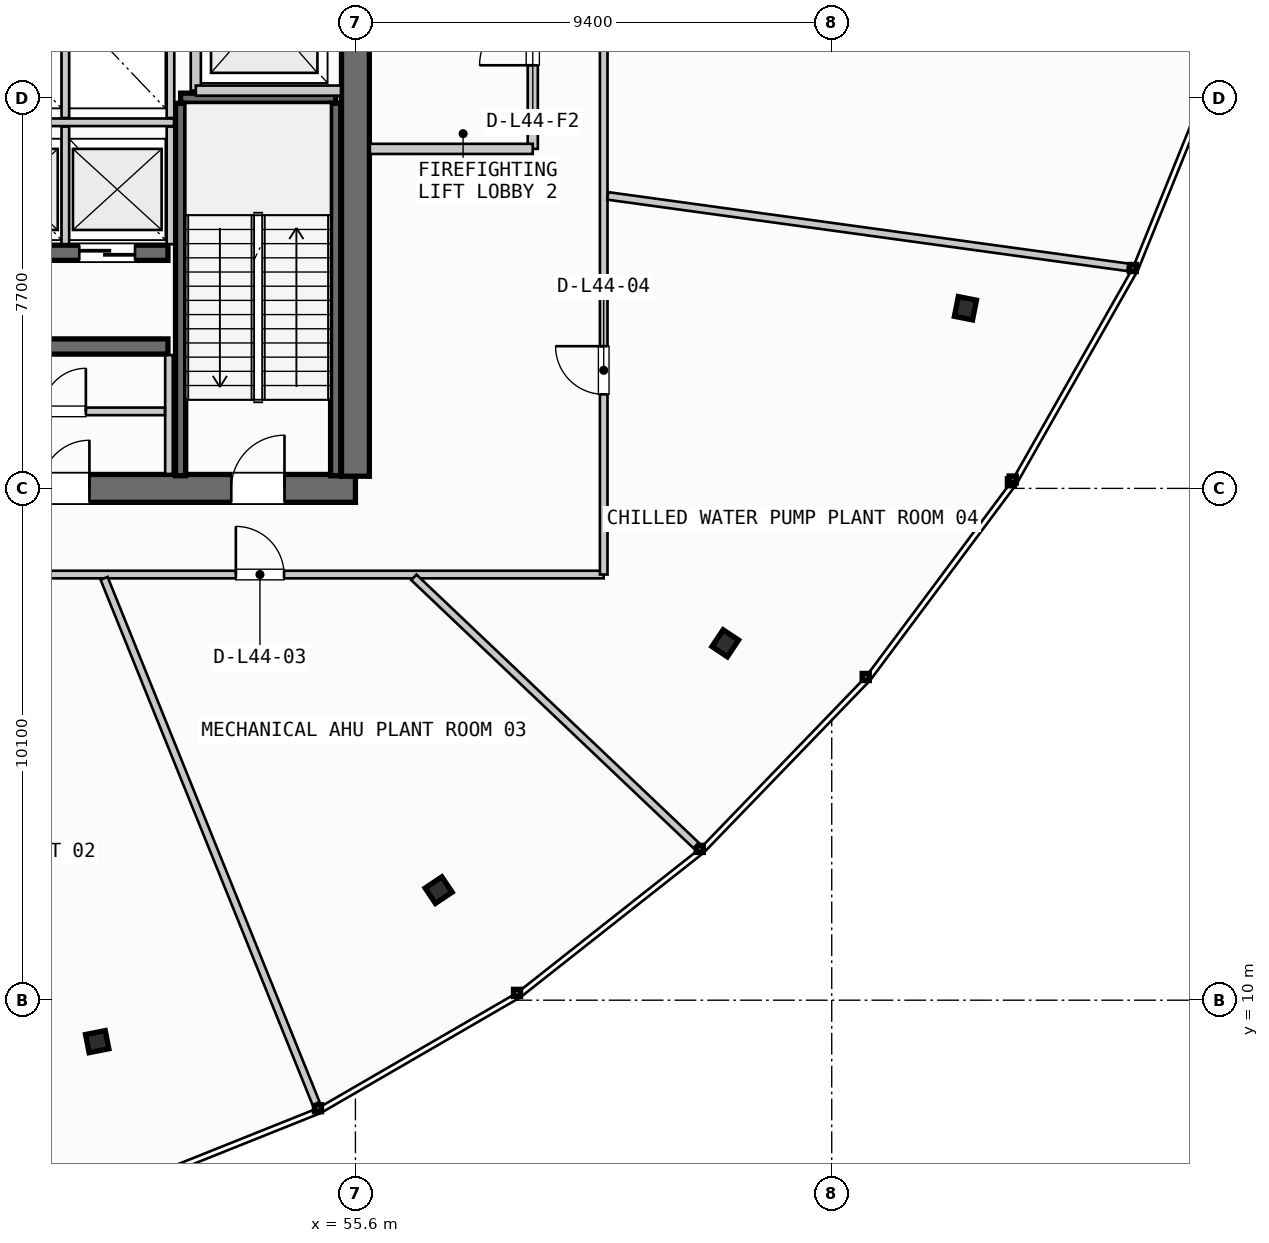
"""IFC4 building model, lengths in metres.
Left out: names, types, materials, properties, quantities, classifications, styles, units other than length and angle.
Written with IfcOpenShell. Run it as: python <this file> out.ifc"""

import sys

from ifc_helpers import new_model, si_unit, direction, frame, frame_2d, origin, origin_2d, place, context, subcontext, project, spatial, rectangle, i_section, extrude, source, transform, mapped, element, fill, save


model = new_model("IFC4")
c1 = context("Model", 3, precision=1e-05, world=origin(), true_north=direction((0.0, 1.0)))
c2 = subcontext(c1, "Body", "Model", "MODEL_VIEW")
j1 = project(units=[si_unit("LENGTHUNIT", "METRE"), si_unit("PLANEANGLEUNIT", "RADIAN")], contexts=[c1])
p1 = place(None, origin())
s1 = spatial("IfcSite", under=j1, at=p1, CompositionType="ELEMENT")
p2 = place(p1, origin())
s2 = spatial("IfcBuilding", under=s1, at=p2, CompositionType="ELEMENT")
p3 = place(p2, frame((0.0, 0.0, 171.4)))
s3 = spatial("IfcBuildingStorey", under=s2, at=p3, CompositionType="ELEMENT", Elevation=171.4)
p4 = place(p3, frame((38.0, 20.1, 0.0), z_axis=(0.0, 0.0, 1.0), x_axis=(1.0, 0.0, 0.0)))
e1 = element("IfcWall", 1, at=p4, inside=s3, PredefinedType="SHEAR", context=c2, shape_type="SweptSolid", body=[
    extrude(rectangle(XDim=17.6, YDim=0.55, at=frame_2d((8.8, 0.0))), origin(), (0.0, 0.0, 1.0), 4.58),
])
p5 = place(p4, frame((1.4, 0.0, 0.0)))
e2 = element("IfcOpeningElement", 2, at=p5, cuts=e1, PredefinedType="OPENING", context=c2, shape_type="SweptSolid", body=[
    extrude(rectangle(XDim=1.05, YDim=2.15, at=frame_2d((0.525, 1.075))), frame((0.0, 0.285, 0.0), z_axis=(0.0, -1.0, 0.0), x_axis=(1.0, 0.0, 0.0)), (0.0, 0.0, 1.0), 0.57),
])
p6 = place(p4, frame((15.15, 0.0, 0.0)))
e3 = element("IfcOpeningElement", 3, at=p6, cuts=e1, PredefinedType="OPENING", context=c2, shape_type="SweptSolid", body=[
    extrude(rectangle(XDim=1.05, YDim=2.15, at=frame_2d((0.525, 1.075))), frame((0.0, 0.285, 0.0), z_axis=(0.0, -1.0, 0.0), x_axis=(1.0, 0.0, 0.0)), (0.0, 0.0, 1.0), 0.57),
])
p7 = place(p4, frame((5.25, 0.0, 0.0)))
e4 = element("IfcOpeningElement", 4, at=p7, cuts=e1, PredefinedType="OPENING", context=c2, shape_type="SweptSolid", body=[
    extrude(rectangle(XDim=0.9, YDim=2.15, at=frame_2d((0.45, 1.075))), frame((0.0, 0.285, 0.0), z_axis=(0.0, -1.0, 0.0), x_axis=(1.0, 0.0, 0.0)), (0.0, 0.0, 1.0), 0.57),
])
p8 = place(p4, frame((11.4, 0.0, 0.0)))
e5 = element("IfcOpeningElement", 5, at=p8, cuts=e1, PredefinedType="OPENING", context=c2, shape_type="SweptSolid", body=[
    extrude(rectangle(XDim=0.95, YDim=2.15, at=frame_2d((0.475, 1.075))), frame((0.0, 0.285, 0.0), z_axis=(0.0, -1.0, 0.0), x_axis=(1.0, 0.0, 0.0)), (0.0, 0.0, 1.0), 0.57),
])
p9 = place(p3, frame((55.6, 20.34, 0.0), z_axis=(0.0, 0.0, 1.0), x_axis=(0.0, 1.0, 0.0)))
e6 = element("IfcWall", 6, at=p9, inside=s3, PredefinedType="SHEAR", context=c2, shape_type="SweptSolid", body=[
    extrude(rectangle(XDim=14.92, YDim=0.55, at=frame_2d((7.46, 0.0))), origin(), (0.0, 0.0, 1.0), 4.58),
])
p10 = place(p9, frame((12.71, 0.0, 0.0)))
e7 = element("IfcOpeningElement", 7, at=p10, cuts=e6, PredefinedType="OPENING", context=c2, shape_type="SweptSolid", body=[
    extrude(rectangle(XDim=1.05, YDim=2.15, at=frame_2d((0.525, 1.075))), frame((0.0, 0.285, 0.0), z_axis=(0.0, -1.0, 0.0), x_axis=(1.0, 0.0, 0.0)), (0.0, 0.0, 1.0), 0.57),
])
p11 = place(p9, frame((8.61, 0.0, 0.0)))
e8 = element("IfcOpeningElement", 8, at=p11, cuts=e6, PredefinedType="OPENING", context=c2, shape_type="SweptSolid", body=[
    extrude(rectangle(XDim=1.1, YDim=2.2, at=frame_2d((0.55, 1.1))), frame((0.0, 0.285, 0.0), z_axis=(0.0, -1.0, 0.0), x_axis=(1.0, 0.0, 0.0)), (0.0, 0.0, 1.0), 0.57),
])
p12 = place(p3, frame((47.65, 22.9, 0.0), z_axis=(0.0, 0.0, 1.0), x_axis=(1.0, 0.0, 0.0)))
e9 = element("IfcWall", 9, at=p12, inside=s3, PredefinedType="SHEAR", context=c2, shape_type="SweptSolid", body=[
    extrude(rectangle(XDim=4.25, YDim=0.3, at=frame_2d((2.125, 0.0))), origin(), (0.0, 0.0, 1.0), 4.58),
])
p13 = place(p3, frame((47.65, 24.75, 0.0), z_axis=(0.0, 0.0, 1.0), x_axis=(1.0, 0.0, 0.0)))
e10 = element("IfcWall", 10, at=p13, inside=s3, PredefinedType="SHEAR", context=c2, shape_type="SweptSolid", body=[
    extrude(rectangle(XDim=4.25, YDim=0.3, at=frame_2d((2.125, 0.0))), origin(), (0.0, 0.0, 1.0), 4.58),
])
p14 = place(p13, frame((0.45, 0.0, 0.0)))
e11 = element("IfcOpeningElement", 11, at=p14, cuts=e10, PredefinedType="OPENING", context=c2, shape_type="SweptSolid", body=[
    extrude(rectangle(XDim=1.1, YDim=2.2, at=frame_2d((0.55, 1.1))), frame((0.0, 0.16, 0.0), z_axis=(0.0, -1.0, 0.0), x_axis=(1.0, 0.0, 0.0)), (0.0, 0.0, 1.0), 0.32),
])
p15 = place(p13, frame((2.5, 0.0, 0.0)))
e12 = element("IfcOpeningElement", 12, at=p15, cuts=e10, PredefinedType="OPENING", context=c2, shape_type="SweptSolid", body=[
    extrude(rectangle(XDim=1.1, YDim=2.2, at=frame_2d((0.55, 1.1))), frame((0.0, 0.16, 0.0), z_axis=(0.0, -1.0, 0.0), x_axis=(1.0, 0.0, 0.0)), (0.0, 0.0, 1.0), 0.32),
])
m1 = source(origin(), c2, "Body", "SweptSolid", [
    extrude(i_section(OverallWidth=0.397, OverallDepth=0.365, WebThickness=0.028, FlangeThickness=0.044, FilletRadius=0.015, at=origin_2d()), origin(), (0.0, 0.0, 1.0), 4.58),
])
for number, where, z_axis, x_axis in (
    (13, (50.503, 9.182, 0.0), (0.0, 0.0, 1.0), (0.195, -0.981, 0.0)),
    (14, (57.242, 12.172, 0.0), (0.0, 0.0, 1.0), (0.556, -0.831, 0.0)),
    (15, (62.899, 17.043, 0.0), (0.0, 0.0, 1.0), (0.831, -0.556, 0.0)),
    (16, (67.639, 23.655, 0.0), (0.0, 0.0, 1.0), (0.981, -0.195, 0.0)),
):
    element("IfcColumn", number, at=place(p3, frame(where, z_axis=z_axis, x_axis=x_axis)), inside=s3, PredefinedType="COLUMN", context=c2, shape_type="MappedRepresentation", body=[
        mapped(m1, transform((0.0, 0.0, 0.0), scale=1.0)),
    ])
p16 = place(p3, frame((52.15, 27.8, 0.0), z_axis=(0.0, 0.0, 1.0), x_axis=(1.0, 0.0, 0.0)))
e17 = element("IfcWall", 17, at=p16, inside=s3, PredefinedType="SHEAR", context=c2, shape_type="SweptSolid", body=[
    extrude(rectangle(XDim=3.06, YDim=0.2, at=frame_2d((1.53, 0.0))), origin(), (0.0, 0.0, 1.0), 4.58),
])
for number, where, z_axis, x_axis in (
    (18, (55.21, 27.7, 0.0), (0.0, 0.0, 1.0), (0.0, -1.0, 0.0)),
    (19, (52.15, 20.35, 0.0), (0.0, 0.0, 1.0), (0.0, 1.0, 0.0)),
):
    element("IfcWall", number, at=place(p3, frame(where, z_axis=z_axis, x_axis=x_axis)), inside=s3, PredefinedType="SHEAR", context=c2, shape_type="SweptSolid", body=[
        extrude(rectangle(XDim=7.35, YDim=0.2, at=frame_2d((3.675, 0.0))), origin(), (0.0, 0.0, 1.0), 4.58),
    ])
p17 = place(p3, frame((52.45, 27.95, 0.0), z_axis=(0.0, 0.0, 1.0), x_axis=(0.0, 1.0, 0.0)))
e20 = element("IfcWall", 20, at=p17, inside=s3, PredefinedType="PARTITIONING", context=c2, shape_type="SweptSolid", body=[
    extrude(rectangle(XDim=3.1, YDim=0.2, at=frame_2d((1.55, 0.0))), origin(), (0.0, 0.0, 1.0), 2.355),
])
p18 = place(p3, frame((52.45, 27.95, 0.0), z_axis=(0.0, 0.0, 1.0), x_axis=(1.0, 0.0, 0.0)))
e21 = element("IfcWall", 21, at=p18, inside=s3, PredefinedType="PARTITIONING", context=c2, shape_type="SweptSolid", body=[
    extrude(rectangle(XDim=2.865, YDim=0.2, at=frame_2d((1.433, 0.0))), origin(), (0.0, 0.0, 1.0), 2.355),
])
p19 = place(p3, frame((59.1, 26.8, 0.0), z_axis=(0.0, 0.0, 1.0), x_axis=(0.0, 1.0, 0.0)))
e22 = element("IfcWall", 22, at=p19, inside=s3, PredefinedType="PARTITIONING", context=c2, shape_type="SweptSolid", body=[
    extrude(rectangle(XDim=4.4, YDim=0.2, at=frame_2d((2.2, 0.0))), origin(), (0.0, 0.0, 1.0), 2.355),
])
p20 = place(p19, frame((1.65, 0.0, 0.0)))
e23 = element("IfcOpeningElement", 23, at=p20, cuts=e22, PredefinedType="OPENING", context=c2, shape_type="SweptSolid", body=[
    extrude(rectangle(XDim=1.05, YDim=2.15, at=frame_2d((0.525, 1.075))), frame((0.0, 0.11, 0.0), z_axis=(0.0, -1.0, 0.0), x_axis=(1.0, 0.0, 0.0)), (0.0, 0.0, 1.0), 0.22),
])
p21 = place(p3, frame((55.885, 26.8, 0.0), z_axis=(0.0, 0.0, 1.0), x_axis=(1.0, 0.0, 0.0)))
e24 = element("IfcWall", 24, at=p21, inside=s3, PredefinedType="PARTITIONING", context=c2, shape_type="SweptSolid", body=[
    extrude(rectangle(XDim=3.215, YDim=0.2, at=frame_2d((1.607, 0.0))), origin(), (0.0, 0.0, 1.0), 2.355),
])
p22 = place(p3, frame((51.92, 20.385, 0.0), z_axis=(0.0, 0.0, 1.0), x_axis=(0.0, 1.0, 0.0)))
e25 = element("IfcWall", 25, at=p22, inside=s3, PredefinedType="PARTITIONING", context=c2, shape_type="SweptSolid", body=[
    extrude(rectangle(XDim=2.345, YDim=0.15, at=frame_2d((1.172, 0.0))), origin(), (0.0, 0.0, 1.0), 2.355),
])
p23 = place(p3, frame((47.88, 21.62, 0.0), z_axis=(0.0, 0.0, 1.0), x_axis=(1.0, 0.0, 0.0)))
e26 = element("IfcWall", 26, at=p23, inside=s3, PredefinedType="PARTITIONING", context=c2, shape_type="SweptSolid", body=[
    extrude(rectangle(XDim=3.96, YDim=0.15, at=frame_2d((1.98, 0.0))), origin(), (0.0, 0.0, 1.0), 2.355),
])
p24 = place(p23, frame((1.55, 0.0, 0.0)))
e27 = element("IfcOpeningElement", 27, at=p24, cuts=e26, PredefinedType="OPENING", context=c2, shape_type="SweptSolid", body=[
    extrude(rectangle(XDim=0.85, YDim=2.15, at=frame_2d((0.425, 1.075))), frame((0.0, 0.085, 0.0), z_axis=(0.0, -1.0, 0.0), x_axis=(1.0, 0.0, 0.0)), (0.0, 0.0, 1.0), 0.17),
])
p25 = place(p3, frame((47.7, 27.325, 0.0), z_axis=(0.0, 0.0, 1.0), x_axis=(1.0, 0.0, 0.0)))
e28 = element("IfcWall", 28, at=p25, inside=s3, PredefinedType="PARTITIONING", context=c2, shape_type="SweptSolid", body=[
    extrude(rectangle(XDim=4.32, YDim=0.15, at=frame_2d((2.16, 0.0))), origin(), (0.0, 0.0, 1.0), 2.355),
])
for number, where, z_axis, x_axis in (
    (29, (49.875, 24.92, 0.0), (0.0, 0.0, 1.0), (0.0, 1.0, 0.0)),
    (30, (51.95, 24.92, 0.0), (0.0, 0.0, 1.0), (0.0, 1.0, 0.0)),
):
    element("IfcWall", number, at=place(p3, frame(where, z_axis=z_axis, x_axis=x_axis)), inside=s3, PredefinedType="PARTITIONING", context=c2, shape_type="SweptSolid", body=[
        extrude(rectangle(XDim=2.32, YDim=0.15, at=frame_2d((1.16, 0.0))), origin(), (0.0, 0.0, 1.0), 2.355),
    ])
for number, where, z_axis, x_axis in (
    (31, (49.875, 27.41, 0.0), (0.0, 0.0, 1.0), (0.0, 1.0, 0.0)),
    (32, (51.95, 27.41, 0.0), (0.0, 0.0, 1.0), (0.0, 1.0, 0.0)),
):
    element("IfcWall", number, at=place(p3, frame(where, z_axis=z_axis, x_axis=x_axis)), inside=s3, PredefinedType="PARTITIONING", context=c2, shape_type="SweptSolid", body=[
        extrude(rectangle(XDim=2.27, YDim=0.15, at=frame_2d((1.135, 0.0))), origin(), (0.0, 0.0, 1.0), 2.355),
    ])
p26 = place(p3, frame((33.1, 18.4, 0.0), z_axis=(0.0, 0.0, 1.0), x_axis=(1.0, 0.0, 0.0)))
e33 = element("IfcWall", 33, at=p26, inside=s3, PredefinedType="PARTITIONING", context=c2, shape_type="SweptSolid", body=[
    extrude(rectangle(XDim=27.4, YDim=0.15, at=frame_2d((13.7, 0.0))), origin(), (0.0, 0.0, 1.0), 2.355),
])
p27 = place(p26, frame((6.185, 0.0, 0.0)))
e34 = element("IfcOpeningElement", 34, at=p27, cuts=e33, PredefinedType="OPENING", context=c2, shape_type="SweptSolid", body=[
    extrude(rectangle(XDim=0.95, YDim=2.15, at=frame_2d((0.475, 1.075))), frame((0.0, 0.085, 0.0), z_axis=(0.0, -1.0, 0.0), x_axis=(1.0, 0.0, 0.0)), (0.0, 0.0, 1.0), 0.17),
])
p28 = place(p26, frame((13.3, 0.0, 0.0)))
e35 = element("IfcOpeningElement", 35, at=p28, cuts=e33, PredefinedType="OPENING", context=c2, shape_type="SweptSolid", body=[
    extrude(rectangle(XDim=0.95, YDim=2.15, at=frame_2d((0.475, 1.075))), frame((0.0, 0.085, 0.0), z_axis=(0.0, -1.0, 0.0), x_axis=(1.0, 0.0, 0.0)), (0.0, 0.0, 1.0), 0.17),
])
p29 = place(p26, frame((20.14, 0.0, 0.0)))
e36 = element("IfcOpeningElement", 36, at=p29, cuts=e33, PredefinedType="OPENING", context=c2, shape_type="SweptSolid", body=[
    extrude(rectangle(XDim=0.95, YDim=2.15, at=frame_2d((0.475, 1.075))), frame((0.0, 0.085, 0.0), z_axis=(0.0, -1.0, 0.0), x_axis=(1.0, 0.0, 0.0)), (0.0, 0.0, 1.0), 0.17),
])
p30 = place(p3, frame((60.5, 18.4, 0.0), z_axis=(0.0, 0.0, 1.0), x_axis=(0.0, 1.0, 0.0)))
e37 = element("IfcWall", 37, at=p30, inside=s3, PredefinedType="PARTITIONING", context=c2, shape_type="SweptSolid", body=[
    extrude(rectangle(XDim=18.8, YDim=0.15, at=frame_2d((9.4, 0.0))), origin(), (0.0, 0.0, 1.0), 2.355),
])
p31 = place(p30, frame((3.556, 0.0, 0.0)))
e38 = element("IfcOpeningElement", 38, at=p31, cuts=e37, PredefinedType="OPENING", context=c2, shape_type="SweptSolid", body=[
    extrude(rectangle(XDim=0.95, YDim=2.15, at=frame_2d((0.475, 1.075))), frame((0.0, 0.085, 0.0), z_axis=(0.0, -1.0, 0.0), x_axis=(1.0, 0.0, 0.0)), (0.0, 0.0, 1.0), 0.17),
])
p32 = place(p30, frame((12.375, 0.0, 0.0)))
e39 = element("IfcOpeningElement", 39, at=p32, cuts=e37, PredefinedType="OPENING", context=c2, shape_type="SweptSolid", body=[
    extrude(rectangle(XDim=0.95, YDim=2.15, at=frame_2d((0.475, 1.075))), frame((0.0, 0.085, 0.0), z_axis=(0.0, -1.0, 0.0), x_axis=(1.0, 0.0, 0.0)), (0.0, 0.0, 1.0), 0.17),
])
p33 = place(p3, frame((50.639, 18.326, 0.0), z_axis=(0.0, 0.0, 1.0), x_axis=(0.374341338062, -0.927290980555, 0.0)))
e40 = element("IfcWall", 40, at=p33, inside=s3, PredefinedType="PARTITIONING", context=c2, shape_type="SweptSolid", body=[
    extrude(rectangle(XDim=11.177, YDim=0.15, at=frame_2d((5.589, 0.0))), origin(), (0.0, 0.0, 1.0), 2.355),
])
p34 = place(p3, frame((56.753, 18.345, 0.0), z_axis=(0.0, 0.0, 1.0), x_axis=(0.725084338086, -0.688660077732, 0.0)))
e41 = element("IfcWall", 41, at=p34, inside=s3, PredefinedType="PARTITIONING", context=c2, shape_type="SweptSolid", body=[
    extrude(rectangle(XDim=7.681, YDim=0.15, at=frame_2d((3.841, 0.0))), origin(), (0.0, 0.0, 1.0), 2.355),
])
p35 = place(p3, frame((60.579, 25.872, 0.0), z_axis=(0.0, 0.0, 1.0), x_axis=(0.990702675866, -0.136044875066, 0.0)))
e42 = element("IfcWall", 42, at=p35, inside=s3, PredefinedType="PARTITIONING", context=c2, shape_type="SweptSolid", body=[
    extrude(rectangle(XDim=10.36, YDim=0.15, at=frame_2d((5.18, 0.0))), origin(), (0.0, 0.0, 1.0), 2.355),
])
m2 = source(origin(), c2, "Body", "SweptSolid", [
    extrude(rectangle(XDim=1.05, YDim=2.15, at=frame_2d((0.525, 1.075))), frame((0.0, 0.025, 0.0), z_axis=(0.0, -1.0, 0.0), x_axis=(1.0, 0.0, 0.0)), (0.0, 0.0, 1.0), 0.05),
])
p36 = place(p6, origin())
e43 = element("IfcDoor", 43, at=p36, inside=s3, OperationType="SINGLE_SWING_RIGHT", PredefinedType="DOOR", context=c2, shape_type="MappedRepresentation", body=[
    mapped(m2, transform((0.0, 0.0, 0.0), scale=1.0)),
])
fill(e3, e43)
m3 = source(origin(), c2, "Body", "SweptSolid", [
    extrude(rectangle(XDim=0.95, YDim=2.15, at=frame_2d((0.475, 1.075))), frame((0.0, 0.025, 0.0), z_axis=(0.0, -1.0, 0.0), x_axis=(1.0, 0.0, 0.0)), (0.0, 0.0, 1.0), 0.05),
])
p37 = place(p8, origin())
e44 = element("IfcDoor", 44, at=p37, inside=s3, OperationType="SINGLE_SWING_RIGHT", PredefinedType="DOOR", context=c2, shape_type="MappedRepresentation", body=[
    mapped(m3, transform((0.0, 0.0, 0.0), scale=1.0)),
])
fill(e5, e44)
m4 = source(origin(), c2, "Body", "SweptSolid", [
    extrude(rectangle(XDim=1.1, YDim=2.2, at=frame_2d((0.55, 1.1))), frame((0.0, 0.025, 0.0), z_axis=(0.0, -1.0, 0.0), x_axis=(1.0, 0.0, 0.0)), (0.0, 0.0, 1.0), 0.05),
])
p38 = place(p15, origin())
e45 = element("IfcDoor", 45, at=p38, inside=s3, OperationType="SLIDING_TO_RIGHT", PredefinedType="DOOR", context=c2, shape_type="MappedRepresentation", body=[
    mapped(m4, transform((0.0, 0.0, 0.0), scale=1.0)),
])
fill(e12, e45)
p39 = place(p20, origin())
e46 = element("IfcDoor", 46, at=p39, inside=s3, OperationType="SINGLE_SWING_LEFT", PredefinedType="DOOR", context=c2, shape_type="MappedRepresentation", body=[
    mapped(m2, transform((0.0, 0.0, 0.0), scale=1.0)),
])
fill(e23, e46)
m5 = source(origin(), c2, "Body", "SweptSolid", [
    extrude(rectangle(XDim=0.85, YDim=2.15, at=frame_2d((0.425, 1.075))), frame((0.0, 0.025, 0.0), z_axis=(0.0, -1.0, 0.0), x_axis=(1.0, 0.0, 0.0)), (0.0, 0.0, 1.0), 0.05),
])
p40 = place(p24, origin())
e47 = element("IfcDoor", 47, at=p40, inside=s3, OperationType="SINGLE_SWING_RIGHT", PredefinedType="DOOR", context=c2, shape_type="MappedRepresentation", body=[
    mapped(m5, transform((0.0, 0.0, 0.0), scale=1.0)),
])
fill(e27, e47)
p41 = place(p29, origin())
e48 = element("IfcDoor", 48, at=p41, inside=s3, OperationType="SINGLE_SWING_LEFT", PredefinedType="DOOR", context=c2, shape_type="MappedRepresentation", body=[
    mapped(m3, transform((0.0, 0.0, 0.0), scale=1.0)),
])
fill(e36, e48)
p42 = place(p31, origin())
e49 = element("IfcDoor", 49, at=p42, inside=s3, OperationType="SINGLE_SWING_RIGHT", PredefinedType="DOOR", context=c2, shape_type="MappedRepresentation", body=[
    mapped(m3, transform((0.0, 0.0, 0.0), scale=1.0)),
])
fill(e38, e49)
save(model, sys.argv[1])
